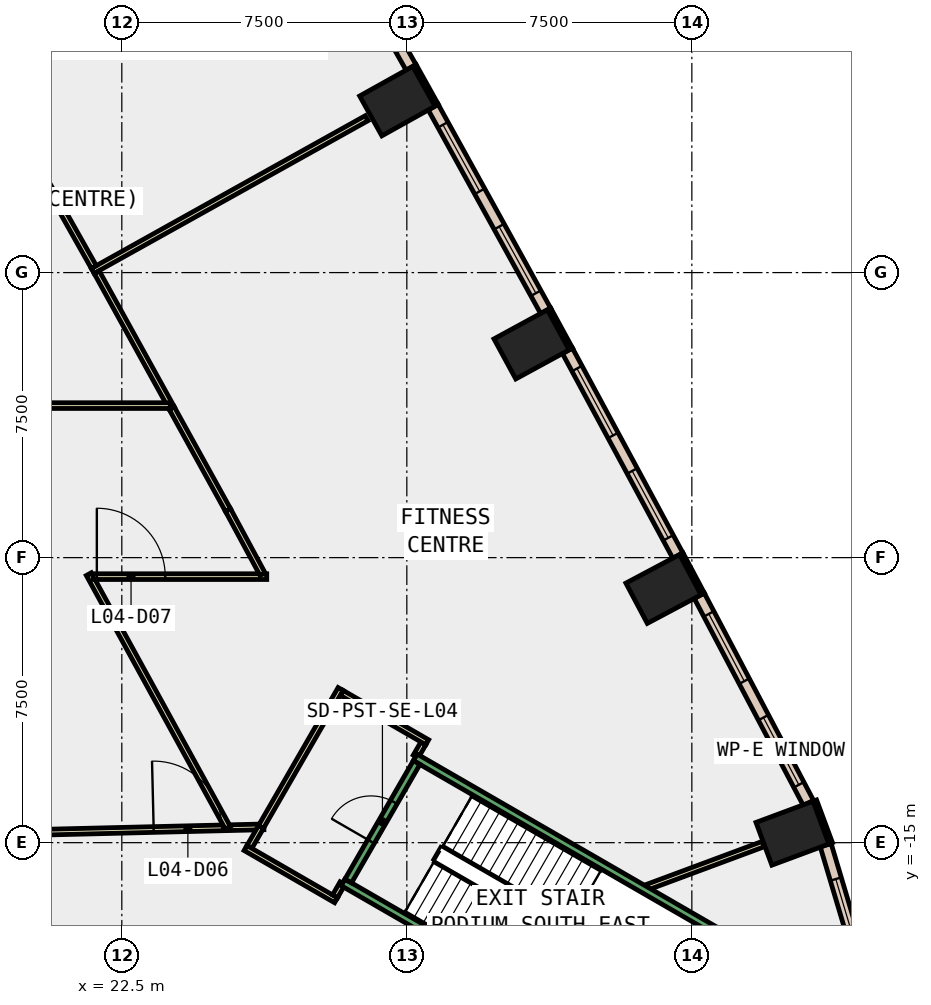
"""IFC4 building model, lengths in metres.
Left out: names, types, materials, properties, quantities, classifications, styles, units other than length and angle.
Written with IfcOpenShell. Run it as: python <this file> out.ifc"""

import sys

from ifc_helpers import new_model, si_unit, direction, frame, frame_2d, origin, origin_2d, place, context, subcontext, project, spatial, rectangle, extrude, element, fill, save


model = new_model("IFC4")
c1 = context("Model", 3, precision=1e-05, world=origin(), true_north=direction((0.0, 1.0)))
c2 = subcontext(c1, "Body", "Model", "MODEL_VIEW")
j1 = project(units=[si_unit("LENGTHUNIT", "METRE"), si_unit("PLANEANGLEUNIT", "RADIAN")], contexts=[c1])
p1 = place(None, origin())
s1 = spatial("IfcSite", under=j1, at=p1, CompositionType="ELEMENT")
p2 = place(p1, origin())
s2 = spatial("IfcBuilding", under=s1, at=p2, CompositionType="ELEMENT")
p3 = place(p2, frame((0.0, 0.0, 25.0)))
s3 = spatial("IfcBuildingStorey", under=s2, at=p3, CompositionType="ELEMENT", Elevation=25.0)
for number, where, z_axis, x_axis in (
    (1, (40.147, -14.751, -0.45), (0.0, 0.0, 1.0), (-0.348, 0.937, 0.0)),
    (2, (36.753, -8.325, -0.45), (0.0, 0.0, 1.0), (-0.469, 0.883, 0.0)),
    (3, (33.283, -1.889, -0.45), (0.0, 0.0, 1.0), (-0.478, 0.878, 0.0)),
    (4, (29.75, 4.512, -0.45), (0.0, 0.0, 1.0), (-0.487, 0.873, 0.0)),
):
    element("IfcColumn", number, at=place(p3, frame(where, z_axis=z_axis, x_axis=x_axis)), inside=s3, PredefinedType="COLUMN", context=c2, shape_type="SweptSolid", body=[
        extrude(rectangle(XDim=1.2, YDim=1.6, at=origin_2d()), origin(), (0.0, 0.0, 1.0), 5.0),
    ])
p4 = place(p3, frame((41.153, -15.018, 0.0), z_axis=(0.0, 0.0, 1.0), x_axis=(-0.348268249601, 0.937394914814, 0.0)))
e5 = element("IfcWall", 5, at=p4, inside=s3, PredefinedType="STANDARD", context=c2, shape_type="SweptSolid", body=[
    extrude(rectangle(XDim=1.2, YDim=0.1, at=frame_2d((0.6, 0.0))), origin(), (0.0, 0.0, 1.0), 4.55),
])
p5 = place(p3, frame((37.785, -8.456, 0.0), z_axis=(0.0, 0.0, 1.0), x_axis=(-0.469383408131, 0.882994459876, 0.0)))
e6 = element("IfcWall", 6, at=p5, inside=s3, PredefinedType="STANDARD", context=c2, shape_type="SweptSolid", body=[
    extrude(rectangle(XDim=1.199, YDim=0.1, at=frame_2d((0.6, 0.0))), origin(), (0.0, 0.0, 1.0), 4.55),
])
p6 = place(p3, frame((34.316, -2.01, 0.0), z_axis=(0.0, 0.0, 1.0), x_axis=(-0.478267644701, 0.878214131082, 0.0)))
e7 = element("IfcWall", 7, at=p6, inside=s3, PredefinedType="STANDARD", context=c2, shape_type="SweptSolid", body=[
    extrude(rectangle(XDim=1.2, YDim=0.1, at=frame_2d((0.6, 0.0))), origin(), (0.0, 0.0, 1.0), 4.55),
])
p7 = place(p3, frame((30.784, 4.402, 0.0), z_axis=(0.0, 0.0, 1.0), x_axis=(-0.486817526853, 0.873503689488, 0.0)))
e8 = element("IfcWall", 8, at=p7, inside=s3, PredefinedType="STANDARD", context=c2, shape_type="SweptSolid", body=[
    extrude(rectangle(XDim=1.2, YDim=0.1, at=frame_2d((0.6, 0.0))), origin(), (0.0, 0.0, 1.0), 4.55),
])
p8 = place(p3, frame((42.011, -18.382, 0.0), z_axis=(0.0, 0.0, 1.0), x_axis=(-0.285800575124, 0.958289116738, 0.0)))
e9 = element("IfcWall", 9, at=p8, inside=s3, PredefinedType="STANDARD", context=c2, shape_type="SweptSolid", body=[
    extrude(rectangle(XDim=3.46, YDim=0.3, at=frame_2d((1.73, 0.0))), origin(), (0.0, 0.0, 1.0), 4.55),
])
p9 = place(p8, frame((0.93, 0.0, 1.0)))
e10 = element("IfcOpeningElement", 10, at=p9, cuts=e9, PredefinedType="OPENING", context=c2, shape_type="SweptSolid", body=[
    extrude(rectangle(XDim=1.6, YDim=3.2, at=frame_2d((0.8, 1.6))), frame((0.0, 0.16, 0.0), z_axis=(0.0, -1.0, 0.0), x_axis=(1.0, 0.0, 0.0)), (0.0, 0.0, 1.0), 0.32),
])
p10 = place(p3, frame((40.568, -13.956, 0.0), z_axis=(0.0, 0.0, 1.0), x_axis=(-0.466125129602, 0.884718804792, 0.0)))
e11 = element("IfcWall", 11, at=p10, inside=s3, PredefinedType="STANDARD", context=c2, shape_type="SweptSolid", body=[
    extrude(rectangle(XDim=6.164, YDim=0.3, at=frame_2d((3.082, 0.0))), origin(), (0.0, 0.0, 1.0), 4.55),
])
p11 = place(p10, frame((0.541, 0.0, 1.0)))
e12 = element("IfcOpeningElement", 12, at=p11, cuts=e11, PredefinedType="OPENING", context=c2, shape_type="SweptSolid", body=[
    extrude(rectangle(XDim=2.0, YDim=3.2, at=frame_2d((1.0, 1.6))), frame((0.0, 0.16, 0.0), z_axis=(0.0, -1.0, 0.0), x_axis=(1.0, 0.0, 0.0)), (0.0, 0.0, 1.0), 0.32),
])
p12 = place(p10, frame((3.623, 0.0, 1.0)))
e13 = element("IfcOpeningElement", 13, at=p12, cuts=e11, PredefinedType="OPENING", context=c2, shape_type="SweptSolid", body=[
    extrude(rectangle(XDim=2.0, YDim=3.2, at=frame_2d((1.0, 1.6))), frame((0.0, 0.16, 0.0), z_axis=(0.0, -1.0, 0.0), x_axis=(1.0, 0.0, 0.0)), (0.0, 0.0, 1.0), 0.32),
])
p13 = place(p3, frame((37.131, -7.446, 0.0), z_axis=(0.0, 0.0, 1.0), x_axis=(-0.474584950749, 0.880209704856, 0.0)))
e14 = element("IfcWall", 14, at=p13, inside=s3, PredefinedType="STANDARD", context=c2, shape_type="SweptSolid", body=[
    extrude(rectangle(XDim=6.121, YDim=0.3, at=frame_2d((3.061, 0.0))), origin(), (0.0, 0.0, 1.0), 4.55),
])
p14 = place(p13, frame((0.53, 0.0, 1.0)))
e15 = element("IfcOpeningElement", 15, at=p14, cuts=e14, PredefinedType="OPENING", context=c2, shape_type="SweptSolid", body=[
    extrude(rectangle(XDim=2.0, YDim=3.2, at=frame_2d((1.0, 1.6))), frame((0.0, 0.16, 0.0), z_axis=(0.0, -1.0, 0.0), x_axis=(1.0, 0.0, 0.0)), (0.0, 0.0, 1.0), 0.32),
])
p15 = place(p13, frame((3.591, 0.0, 1.0)))
e16 = element("IfcOpeningElement", 16, at=p15, cuts=e14, PredefinedType="OPENING", context=c2, shape_type="SweptSolid", body=[
    extrude(rectangle(XDim=2.0, YDim=3.2, at=frame_2d((1.0, 1.6))), frame((0.0, 0.16, 0.0), z_axis=(0.0, -1.0, 0.0), x_axis=(1.0, 0.0, 0.0)), (0.0, 0.0, 1.0), 0.32),
])
p16 = place(p3, frame((33.652, -1.006, 0.0), z_axis=(0.0, 0.0, 1.0), x_axis=(-0.483233380559, 0.875491576152, 0.0)))
e17 = element("IfcWall", 17, at=p16, inside=s3, PredefinedType="STANDARD", context=c2, shape_type="SweptSolid", body=[
    extrude(rectangle(XDim=6.121, YDim=0.3, at=frame_2d((3.061, 0.0))), origin(), (0.0, 0.0, 1.0), 4.55),
])
p17 = place(p16, frame((0.53, 0.0, 1.0)))
e18 = element("IfcOpeningElement", 18, at=p17, cuts=e17, PredefinedType="OPENING", context=c2, shape_type="SweptSolid", body=[
    extrude(rectangle(XDim=2.0, YDim=3.2, at=frame_2d((1.0, 1.6))), frame((0.0, 0.16, 0.0), z_axis=(0.0, -1.0, 0.0), x_axis=(1.0, 0.0, 0.0)), (0.0, 0.0, 1.0), 0.32),
])
p18 = place(p16, frame((3.591, 0.0, 1.0)))
e19 = element("IfcOpeningElement", 19, at=p18, cuts=e17, PredefinedType="OPENING", context=c2, shape_type="SweptSolid", body=[
    extrude(rectangle(XDim=2.0, YDim=3.2, at=frame_2d((1.0, 1.6))), frame((0.0, 0.16, 0.0), z_axis=(0.0, -1.0, 0.0), x_axis=(1.0, 0.0, 0.0)), (0.0, 0.0, 1.0), 0.32),
])
p19 = place(p3, frame((30.111, 5.399, 0.0), z_axis=(0.0, 0.0, 1.0), x_axis=(-0.491661677717, 0.870786308267, 0.0)))
e20 = element("IfcWall", 20, at=p19, inside=s3, PredefinedType="STANDARD", context=c2, shape_type="SweptSolid", body=[
    extrude(rectangle(XDim=6.122, YDim=0.3, at=frame_2d((3.061, 0.0))), origin(), (0.0, 0.0, 1.0), 4.55),
])
p20 = place(p19, frame((0.531, 0.0, 1.0)))
e21 = element("IfcOpeningElement", 21, at=p20, cuts=e20, PredefinedType="OPENING", context=c2, shape_type="SweptSolid", body=[
    extrude(rectangle(XDim=2.0, YDim=3.2, at=frame_2d((1.0, 1.6))), frame((0.0, 0.16, 0.0), z_axis=(0.0, -1.0, 0.0), x_axis=(1.0, 0.0, 0.0)), (0.0, 0.0, 1.0), 0.32),
])
p21 = place(p19, frame((3.592, 0.0, 1.0)))
e22 = element("IfcOpeningElement", 22, at=p21, cuts=e20, PredefinedType="OPENING", context=c2, shape_type="SweptSolid", body=[
    extrude(rectangle(XDim=2.0, YDim=3.2, at=frame_2d((1.0, 1.6))), frame((0.0, 0.16, 0.0), z_axis=(0.0, -1.0, 0.0), x_axis=(1.0, 0.0, 0.0)), (0.0, 0.0, 1.0), 0.32),
])
p22 = place(p3, frame((36.334, -16.168, 0.0), z_axis=(0.0, 0.0, 1.0), x_axis=(0.937400028274, 0.348254485961, 0.0)))
e23 = element("IfcWall", 23, at=p22, inside=s3, PredefinedType="PARTITIONING", context=c2, shape_type="SweptSolid", body=[
    extrude(rectangle(XDim=3.247, YDim=0.15, at=frame_2d((1.624, 0.0))), origin(), (0.0, 0.0, 1.0), 4.55),
])
p23 = place(p3, frame((18.715, -14.766, 0.0), z_axis=(0.0, 0.0, 1.0), x_axis=(0.999706996131, 0.024205823405, 0.0)))
e24 = element("IfcWall", 24, at=p23, inside=s3, PredefinedType="PARTITIONING", context=c2, shape_type="SweptSolid", body=[
    extrude(rectangle(XDim=7.524, YDim=0.15, at=frame_2d((3.762, 0.0))), origin(), (0.0, 0.0, 1.0), 4.55),
])
p24 = place(p23, frame((4.625, 0.0, 0.0)))
e25 = element("IfcOpeningElement", 25, at=p24, cuts=e24, PredefinedType="OPENING", context=c2, shape_type="SweptSolid", body=[
    extrude(rectangle(XDim=1.8, YDim=2.1, at=frame_2d((0.9, 1.05))), frame((0.0, 0.085, 0.0), z_axis=(0.0, -1.0, 0.0), x_axis=(1.0, 0.0, 0.0)), (0.0, 0.0, 1.0), 0.17),
])
p25 = place(p3, frame((26.162, -14.586, 0.0), z_axis=(0.0, 0.0, 1.0), x_axis=(-0.499849787464, -0.866112111665, 0.0)))
e26 = element("IfcWall", 26, at=p25, inside=s3, PredefinedType="PARTITIONING", context=c2, shape_type="SweptSolid", body=[
    extrude(rectangle(XDim=0.609, YDim=0.15, at=frame_2d((0.304, 0.0))), origin(), (0.0, 0.0, 1.0), 4.55),
])
p26 = place(p3, frame((25.755, -15.141, 0.0), z_axis=(0.0, 0.0, 1.0), x_axis=(0.866263914087, -0.499586660302, 0.0)))
e27 = element("IfcWall", 27, at=p26, inside=s3, PredefinedType="PARTITIONING", context=c2, shape_type="SweptSolid", body=[
    extrude(rectangle(XDim=2.75, YDim=0.15, at=frame_2d((1.375, 0.0))), origin(), (0.0, 0.0, 1.0), 4.55),
])
p27 = place(p3, frame((28.11, -16.413, 0.0), z_axis=(0.0, 0.0, 1.0), x_axis=(0.498310290291, 0.866998762739, 0.0)))
e28 = element("IfcWall", 28, at=p27, inside=s3, PredefinedType="PARTITIONING", context=c2, shape_type="SweptSolid", body=[
    extrude(rectangle(XDim=0.399, YDim=0.15, at=frame_2d((0.2, 0.0))), origin(), (0.0, 0.0, 1.0), 4.55),
])
p28 = place(p3, frame((21.735, 0.044, 0.0), z_axis=(0.0, 0.0, 1.0), x_axis=(0.873420749931, 0.48696631669, 0.0)))
e29 = element("IfcWall", 29, at=p28, inside=s3, PredefinedType="PARTITIONING", context=c2, shape_type="SweptSolid", body=[
    extrude(rectangle(XDim=8.251, YDim=0.15, at=frame_2d((4.125, 0.0))), origin(), (0.0, 0.0, 1.0), 4.55),
])
p29 = place(p3, frame((25.289, -14.607, 0.0), z_axis=(0.0, 0.0, 1.0), x_axis=(-0.480597861754, 0.876941101373, 0.0)))
e30 = element("IfcWall", 30, at=p29, inside=s3, PredefinedType="PARTITIONING", context=c2, shape_type="SweptSolid", body=[
    extrude(rectangle(XDim=7.609, YDim=0.15, at=frame_2d((3.805, 0.0))), origin(), (0.0, 0.0, 1.0), 4.55),
])
p30 = place(p3, frame((21.743, -8.0, 0.0), z_axis=(0.0, 0.0, 1.0), x_axis=(1.0, 0.0, 0.0)))
e31 = element("IfcWall", 31, at=p30, inside=s3, PredefinedType="PARTITIONING", context=c2, shape_type="SweptSolid", body=[
    extrude(rectangle(XDim=4.571, YDim=0.15, at=frame_2d((2.286, 0.0))), origin(), (0.0, 0.0, 1.0), 4.55),
])
p31 = place(p30, frame((0.1, 0.0, 0.0)))
e32 = element("IfcOpeningElement", 32, at=p31, cuts=e31, PredefinedType="OPENING", context=c2, shape_type="SweptSolid", body=[
    extrude(rectangle(XDim=1.8, YDim=2.1, at=frame_2d((0.9, 1.05))), frame((0.0, 0.085, 0.0), z_axis=(0.0, -1.0, 0.0), x_axis=(1.0, 0.0, 0.0)), (0.0, 0.0, 1.0), 0.17),
])
p32 = place(p3, frame((26.203, -7.934, 0.0), z_axis=(0.0, 0.0, 1.0), x_axis=(-0.474533012185, 0.880237706728, 0.0)))
e33 = element("IfcWall", 33, at=p32, inside=s3, PredefinedType="PARTITIONING", context=c2, shape_type="SweptSolid", body=[
    extrude(rectangle(XDim=1.916, YDim=0.15, at=frame_2d((0.958, 0.0))), origin(), (0.0, 0.0, 1.0), 4.55),
])
p33 = place(p3, frame((30.235, -12.733, 0.0), z_axis=(0.0, 0.0, 1.0), x_axis=(0.499352927503, 0.866398669086, 0.0)))
e34 = element("IfcWall", 34, at=p33, inside=s3, PredefinedType="PARTITIONING", context=c2, shape_type="SweptSolid", body=[
    extrude(rectangle(XDim=0.4, YDim=0.15, at=frame_2d((0.2, 0.0))), origin(), (0.0, 0.0, 1.0), 4.55),
])
p34 = place(p3, frame((30.537, -12.358, 0.0), z_axis=(0.0, 0.0, 1.0), x_axis=(-0.866108986466, 0.499855202596, 0.0)))
e35 = element("IfcWall", 35, at=p34, inside=s3, PredefinedType="PARTITIONING", context=c2, shape_type="SweptSolid", body=[
    extrude(rectangle(XDim=2.6, YDim=0.15, at=frame_2d((1.3, 0.0))), origin(), (0.0, 0.0, 1.0), 4.55),
])
p35 = place(p3, frame((28.257, -10.956, 0.0), z_axis=(0.0, 0.0, 1.0), x_axis=(-0.49986701167, -0.866102171019, 0.0)))
e36 = element("IfcWall", 36, at=p35, inside=s3, PredefinedType="PARTITIONING", context=c2, shape_type="SweptSolid", body=[
    extrude(rectangle(XDim=4.191, YDim=0.15, at=frame_2d((2.096, 0.0))), origin(), (0.0, 0.0, 1.0), 4.55),
])
p36 = place(p3, frame((23.813, -3.566, 0.0), z_axis=(0.0, 0.0, 1.0), x_axis=(0.483368016909, -0.875417249219, 0.0)))
e37 = element("IfcWall", 37, at=p36, inside=s3, PredefinedType="PARTITIONING", context=c2, shape_type="SweptSolid", body=[
    extrude(rectangle(XDim=3.064, YDim=0.15, at=frame_2d((1.532, 0.0))), origin(), (0.0, 0.0, 1.0), 4.55),
])
p37 = place(p3, frame((23.814, -3.565, 0.0), z_axis=(0.0, 0.0, 1.0), x_axis=(-0.483357057036, 0.875423300703, 0.0)))
e38 = element("IfcWall", 38, at=p37, inside=s3, PredefinedType="PARTITIONING", context=c2, shape_type="SweptSolid", body=[
    extrude(rectangle(XDim=4.084, YDim=0.15, at=frame_2d((2.042, 0.0))), origin(), (0.0, 0.0, 1.0), 4.55),
])
p38 = place(p3, frame((21.764, 0.146, 0.0), z_axis=(0.0, 0.0, 1.0), x_axis=(-0.491550482328, 0.87084908183, 0.0)))
e39 = element("IfcWall", 39, at=p38, inside=s3, PredefinedType="PARTITIONING", context=c2, shape_type="SweptSolid", body=[
    extrude(rectangle(XDim=7.145, YDim=0.15, at=frame_2d((3.572, 0.0))), origin(), (0.0, 0.0, 1.0), 4.55),
])
p39 = place(p3, frame((11.012, -3.5, 0.0), z_axis=(0.0, 0.0, 1.0), x_axis=(1.0, 0.0, 0.0)))
e40 = element("IfcWall", 40, at=p39, inside=s3, PredefinedType="PARTITIONING", context=c2, shape_type="SweptSolid", body=[
    extrude(rectangle(XDim=12.765, YDim=0.15, at=frame_2d((6.383, 0.0))), origin(), (0.0, 0.0, 1.0), 4.55),
])
p40 = place(p39, frame((5.21, 0.0, 0.0)))
e41 = element("IfcOpeningElement", 41, at=p40, cuts=e40, PredefinedType="OPENING", context=c2, shape_type="SweptSolid", body=[
    extrude(rectangle(XDim=1.8, YDim=2.1, at=frame_2d((0.9, 1.05))), frame((0.0, 0.085, 0.0), z_axis=(0.0, -1.0, 0.0), x_axis=(1.0, 0.0, 0.0)), (0.0, 0.0, 1.0), 0.17),
])
for number, where, z_axis, x_axis in (
    (42, (28.322, -16.045, 0.0), (0.0, 0.0, 1.0), (0.866, -0.5, 0.0)),
    (43, (30.222, -12.755, 0.0), (0.0, 0.0, 1.0), (0.866, -0.5, 0.0)),
):
    element("IfcWall", number, at=place(p3, frame(where, z_axis=z_axis, x_axis=x_axis)), inside=s3, PredefinedType="STANDARD", context=c2, shape_type="SweptSolid", body=[
        extrude(rectangle(XDim=9.8, YDim=0.2, at=frame_2d((4.9, 0.0))), origin(), (0.0, 0.0, 1.0), 4.55),
    ])
p41 = place(p3, frame((28.458, -16.009, 0.0), z_axis=(0.0, 0.0, 1.0), x_axis=(0.499982693035, 0.866035395735, 0.0)))
e44 = element("IfcWall", 44, at=p41, inside=s3, PredefinedType="STANDARD", context=c2, shape_type="SweptSolid", body=[
    extrude(rectangle(XDim=3.6, YDim=0.2, at=frame_2d((1.8, 0.0))), origin(), (0.0, 0.0, 1.0), 4.55),
])
p42 = place(p41, frame((1.2, 0.0, 0.0)))
e45 = element("IfcOpeningElement", 45, at=p42, cuts=e44, PredefinedType="OPENING", context=c2, shape_type="SweptSolid", body=[
    extrude(rectangle(XDim=1.2, YDim=2.2, at=frame_2d((0.6, 1.1))), frame((0.0, 0.11, 0.0), z_axis=(0.0, -1.0, 0.0), x_axis=(1.0, 0.0, 0.0)), (0.0, 0.0, 1.0), 0.22),
])
p43 = place(p9, origin())
e46 = element("IfcWindow", 46, at=p43, inside=s3, PartitioningType="SINGLE_PANEL", PredefinedType="WINDOW", context=c2, shape_type="SweptSolid", body=[
    extrude(rectangle(XDim=1.6, YDim=3.2, at=frame_2d((0.8, 1.6))), frame((0.0, 0.03, 0.0), z_axis=(0.0, -1.0, 0.0), x_axis=(1.0, 0.0, 0.0)), (0.0, 0.0, 1.0), 0.06),
])
fill(e10, e46)
p44 = place(p11, origin())
e47 = element("IfcWindow", 47, at=p44, inside=s3, PartitioningType="SINGLE_PANEL", PredefinedType="WINDOW", context=c2, shape_type="SweptSolid", body=[
    extrude(rectangle(XDim=2.0, YDim=3.2, at=frame_2d((1.0, 1.6))), frame((0.0, 0.03, 0.0), z_axis=(0.0, -1.0, 0.0), x_axis=(1.0, 0.0, 0.0)), (0.0, 0.0, 1.0), 0.06),
])
fill(e12, e47)
p45 = place(p12, origin())
e48 = element("IfcWindow", 48, at=p45, inside=s3, PartitioningType="SINGLE_PANEL", PredefinedType="WINDOW", context=c2, shape_type="SweptSolid", body=[
    extrude(rectangle(XDim=2.0, YDim=3.2, at=frame_2d((1.0, 1.6))), frame((0.0, 0.03, 0.0), z_axis=(0.0, -1.0, 0.0), x_axis=(1.0, 0.0, 0.0)), (0.0, 0.0, 1.0), 0.06),
])
fill(e13, e48)
p46 = place(p14, origin())
e49 = element("IfcWindow", 49, at=p46, inside=s3, PartitioningType="SINGLE_PANEL", PredefinedType="WINDOW", context=c2, shape_type="SweptSolid", body=[
    extrude(rectangle(XDim=2.0, YDim=3.2, at=frame_2d((1.0, 1.6))), frame((0.0, 0.03, 0.0), z_axis=(0.0, -1.0, 0.0), x_axis=(1.0, 0.0, 0.0)), (0.0, 0.0, 1.0), 0.06),
])
fill(e15, e49)
p47 = place(p15, origin())
e50 = element("IfcWindow", 50, at=p47, inside=s3, PartitioningType="SINGLE_PANEL", PredefinedType="WINDOW", context=c2, shape_type="SweptSolid", body=[
    extrude(rectangle(XDim=2.0, YDim=3.2, at=frame_2d((1.0, 1.6))), frame((0.0, 0.03, 0.0), z_axis=(0.0, -1.0, 0.0), x_axis=(1.0, 0.0, 0.0)), (0.0, 0.0, 1.0), 0.06),
])
fill(e16, e50)
p48 = place(p17, origin())
e51 = element("IfcWindow", 51, at=p48, inside=s3, PartitioningType="SINGLE_PANEL", PredefinedType="WINDOW", context=c2, shape_type="SweptSolid", body=[
    extrude(rectangle(XDim=2.0, YDim=3.2, at=frame_2d((1.0, 1.6))), frame((0.0, 0.03, 0.0), z_axis=(0.0, -1.0, 0.0), x_axis=(1.0, 0.0, 0.0)), (0.0, 0.0, 1.0), 0.06),
])
fill(e18, e51)
p49 = place(p18, origin())
e52 = element("IfcWindow", 52, at=p49, inside=s3, PartitioningType="SINGLE_PANEL", PredefinedType="WINDOW", context=c2, shape_type="SweptSolid", body=[
    extrude(rectangle(XDim=2.0, YDim=3.2, at=frame_2d((1.0, 1.6))), frame((0.0, 0.03, 0.0), z_axis=(0.0, -1.0, 0.0), x_axis=(1.0, 0.0, 0.0)), (0.0, 0.0, 1.0), 0.06),
])
fill(e19, e52)
p50 = place(p24, origin())
e53 = element("IfcDoor", 53, at=p50, inside=s3, OperationType="DOUBLE_DOOR_SINGLE_SWING", PredefinedType="DOOR", context=c2, shape_type="SweptSolid", body=[
    extrude(rectangle(XDim=1.8, YDim=2.1, at=frame_2d((0.9, 1.05))), frame((0.0, 0.025, 0.0), z_axis=(0.0, -1.0, 0.0), x_axis=(1.0, 0.0, 0.0)), (0.0, 0.0, 1.0), 0.05),
])
fill(e25, e53)
p51 = place(p31, origin())
e54 = element("IfcDoor", 54, at=p51, inside=s3, OperationType="DOUBLE_DOOR_SINGLE_SWING", PredefinedType="DOOR", context=c2, shape_type="SweptSolid", body=[
    extrude(rectangle(XDim=1.8, YDim=2.1, at=frame_2d((0.9, 1.05))), frame((0.0, 0.025, 0.0), z_axis=(0.0, -1.0, 0.0), x_axis=(1.0, 0.0, 0.0)), (0.0, 0.0, 1.0), 0.05),
])
fill(e32, e54)
p52 = place(p42, origin())
e55 = element("IfcDoor", 55, at=p52, inside=s3, OperationType="SINGLE_SWING_LEFT", PredefinedType="DOOR", context=c2, shape_type="SweptSolid", body=[
    extrude(rectangle(XDim=1.2, YDim=2.2, at=frame_2d((0.6, 1.1))), frame((0.0, 0.025, 0.0), z_axis=(0.0, -1.0, 0.0), x_axis=(1.0, 0.0, 0.0)), (0.0, 0.0, 1.0), 0.05),
])
fill(e45, e55)
save(model, sys.argv[1])
